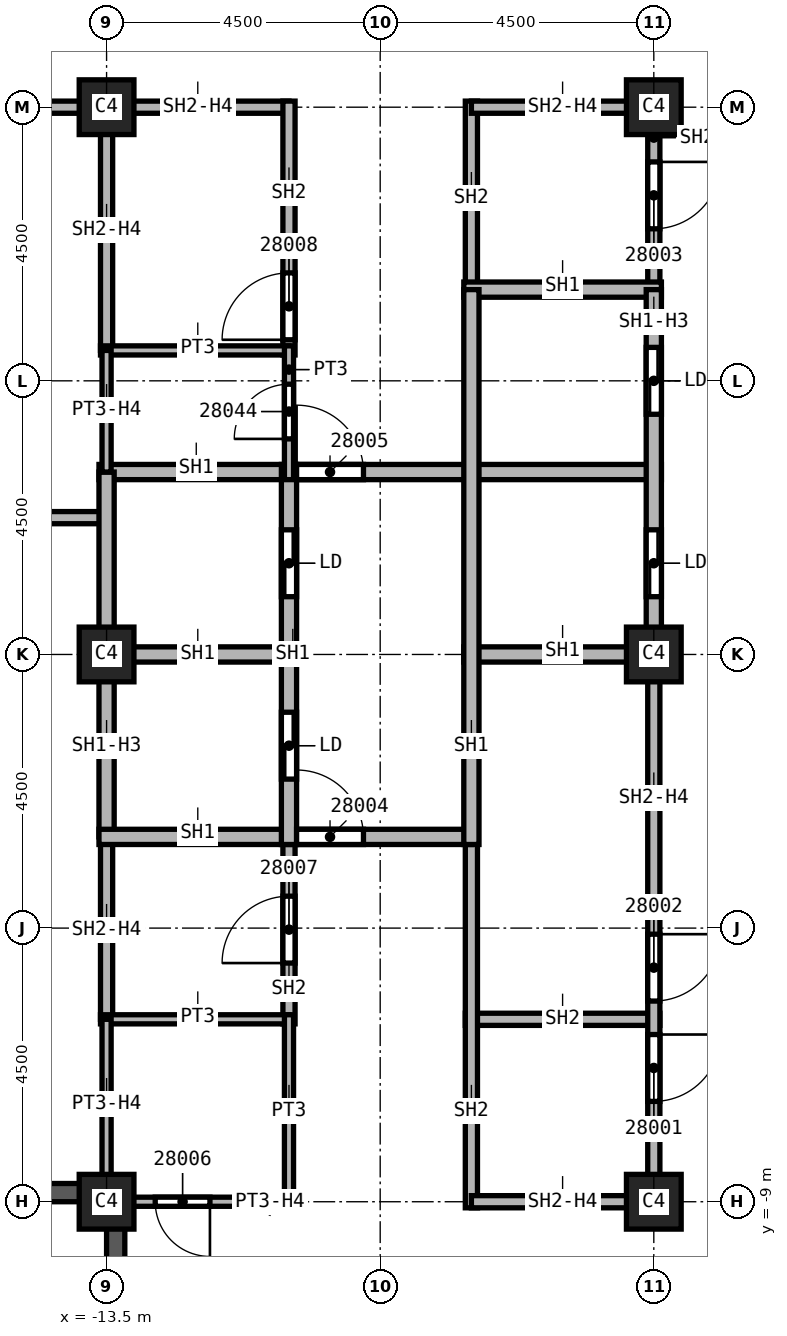
"""IFC4 building model, lengths in metres.
Left out: names, types, materials, properties, quantities, classifications, styles, units other than length and angle.
Written with IfcOpenShell. Run it as: python <this file> out.ifc"""

import sys

from ifc_helpers import new_model, si_unit, direction, frame, frame_2d, origin, origin_2d, place, context, subcontext, project, spatial, rectangle, extrude, element, fill, save


model = new_model("IFC4")
c1 = context("Model", 3, precision=1e-05, world=origin(), true_north=direction((0.0, 1.0)))
c2 = subcontext(c1, "Body", "Model", "MODEL_VIEW")
j1 = project(units=[si_unit("LENGTHUNIT", "METRE"), si_unit("PLANEANGLEUNIT", "RADIAN")], contexts=[c1])
p1 = place(None, origin())
s1 = spatial("IfcSite", under=j1, at=p1, CompositionType="ELEMENT")
p2 = place(p1, origin())
s2 = spatial("IfcBuilding", under=s1, at=p2, CompositionType="ELEMENT")
p3 = place(p2, frame((0.0, 0.0, 236.0)))
s3 = spatial("IfcBuildingStorey", under=s2, at=p3, CompositionType="ELEMENT", Elevation=236.0)
for number, where, z_axis, x_axis in (
    (1, (-4.5, 0.0, 0.0), (0.0, 0.0, 1.0), (1.0, 0.0, 0.0)),
    (2, (-4.5, 9.0, 0.0), (0.0, 0.0, 1.0), (1.0, 0.0, 0.0)),
    (3, (-4.5, -9.0, 0.0), (0.0, 0.0, 1.0), (1.0, 0.0, 0.0)),
    (4, (-13.5, 0.0, 0.0), (0.0, 0.0, 1.0), (1.0, 0.0, 0.0)),
    (5, (-13.5, 9.0, 0.0), (0.0, 0.0, 1.0), (1.0, 0.0, 0.0)),
    (6, (-13.5, -9.0, 0.0), (0.0, 0.0, 1.0), (1.0, 0.0, 0.0)),
):
    element("IfcColumn", number, at=place(p3, frame(where, z_axis=z_axis, x_axis=x_axis)), inside=s3, PredefinedType="COLUMN", context=c2, shape_type="SweptSolid", body=[
        extrude(rectangle(XDim=0.9, YDim=0.9, at=origin_2d()), origin(), (0.0, 0.0, 1.0), 5.72),
    ])
p4 = place(p3, frame((-13.35, -17.5, 0.0), z_axis=(0.0, 0.0, 1.0), x_axis=(0.0, 1.0, 0.0)))
e7 = element("IfcWall", 7, at=p4, inside=s3, PredefinedType="SOLIDWALL", context=c2, shape_type="SweptSolid", body=[
    extrude(rectangle(XDim=8.475, YDim=0.3, at=frame_2d((4.238, 0.0))), origin(), (0.0, 0.0, 1.0), 5.12),
])
p5 = place(p4, frame((3.425, 0.0, 0.0)))
e8 = element("IfcOpeningElement", 8, at=p5, cuts=e7, PredefinedType="OPENING", context=c2, shape_type="SweptSolid", body=[
    extrude(rectangle(XDim=1.2, YDim=2.4, at=frame_2d((0.6, 1.2))), frame((0.0, 0.15, 0.0), z_axis=(0.0, -1.0, 0.0), x_axis=(1.0, 0.0, 0.0)), (0.0, 0.0, 1.0), 0.3),
])
p6 = place(p3, frame((-22.0, -8.85, 0.0), z_axis=(0.0, 0.0, 1.0), x_axis=(1.0, 0.0, 0.0)))
e9 = element("IfcWall", 9, at=p6, inside=s3, PredefinedType="SOLIDWALL", context=c2, shape_type="SweptSolid", body=[
    extrude(rectangle(XDim=8.475, YDim=0.3, at=frame_2d((4.238, 0.0))), origin(), (0.0, 0.0, 1.0), 5.12),
])
for number, where, z_axis, x_axis in (
    (10, (-18.0, 2.25, 0.0), (0.0, 0.0, 1.0), (1.0, 0.0, 0.0)),
    (11, (-13.5, 9.0, 0.0), (0.0, 0.0, 1.0), (-1.0, 0.0, 0.0)),
):
    element("IfcWall", number, at=place(p3, frame(where, z_axis=z_axis, x_axis=x_axis)), inside=s3, PredefinedType="PARTITIONING", context=c2, shape_type="SweptSolid", body=[
        extrude(rectangle(XDim=4.5, YDim=0.2, at=frame_2d((2.25, 0.0))), origin(), (0.0, 0.0, 1.0), 5.72),
    ])
p7 = place(p3, frame((-13.6, 9.0, 0.0), z_axis=(0.0, 0.0, 1.0), x_axis=(1.0, 0.0, 0.0)))
e12 = element("IfcWall", 12, at=p7, inside=s3, PredefinedType="SOLIDWALL", context=c2, shape_type="SweptSolid", body=[
    extrude(rectangle(XDim=3.1, YDim=0.2, at=frame_2d((1.55, 0.0))), origin(), (0.0, 0.0, 1.0), 5.042),
])
p8 = place(p3, frame((-13.5, -6.0, 0.0), z_axis=(0.0, 0.0, 1.0), x_axis=(0.0, 1.0, 0.0)))
e13 = element("IfcWall", 13, at=p8, inside=s3, PredefinedType="SOLIDWALL", context=c2, shape_type="SweptSolid", body=[
    extrude(rectangle(XDim=3.0, YDim=0.2, at=frame_2d((1.5, 0.0))), origin(), (0.0, 0.0, 1.0), 5.042),
])
p9 = place(p3, frame((-13.5, 5.0, 0.0), z_axis=(0.0, 0.0, 1.0), x_axis=(0.0, 1.0, 0.0)))
e14 = element("IfcWall", 14, at=p9, inside=s3, PredefinedType="SOLIDWALL", context=c2, shape_type="SweptSolid", body=[
    extrude(rectangle(XDim=4.1, YDim=0.2, at=frame_2d((2.05, 0.0))), origin(), (0.0, 0.0, 1.0), 5.042),
])
p10 = place(p3, frame((-10.5, -6.075, 0.0), z_axis=(0.0, 0.0, 1.0), x_axis=(0.0, 1.0, 0.0)))
e15 = element("IfcWall", 15, at=p10, inside=s3, PredefinedType="SOLIDWALL", context=c2, shape_type="SweptSolid", body=[
    extrude(rectangle(XDim=3.2, YDim=0.2, at=frame_2d((1.6, 0.0))), origin(), (0.0, 0.0, 1.0), 5.72),
])
p11 = place(p10, frame((1.0, 0.0, 0.0)))
e16 = element("IfcOpeningElement", 16, at=p11, cuts=e15, PredefinedType="OPENING", context=c2, shape_type="SweptSolid", body=[
    extrude(rectangle(XDim=1.1, YDim=2.1, at=frame_2d((0.55, 1.05))), frame((0.0, 0.1, 0.0), z_axis=(0.0, -1.0, 0.0), x_axis=(1.0, 0.0, 0.0)), (0.0, 0.0, 1.0), 0.2),
])
p12 = place(p3, frame((-10.5, 4.925, 0.0), z_axis=(0.0, 0.0, 1.0), x_axis=(0.0, 1.0, 0.0)))
e17 = element("IfcWall", 17, at=p12, inside=s3, PredefinedType="SOLIDWALL", context=c2, shape_type="SweptSolid", body=[
    extrude(rectangle(XDim=4.175, YDim=0.2, at=frame_2d((2.087, 0.0))), origin(), (0.0, 0.0, 1.0), 5.72),
])
p13 = place(p12, frame((0.25, 0.0, 0.0)))
e18 = element("IfcOpeningElement", 18, at=p13, cuts=e17, PredefinedType="OPENING", context=c2, shape_type="SweptSolid", body=[
    extrude(rectangle(XDim=1.1, YDim=2.1, at=frame_2d((0.55, 1.05))), frame((0.0, 0.1, 0.0), z_axis=(0.0, -1.0, 0.0), x_axis=(1.0, 0.0, 0.0)), (0.0, 0.0, 1.0), 0.2),
])
p14 = place(p3, frame((-7.6, -6.0, 0.0), z_axis=(0.0, 0.0, 1.0), x_axis=(1.0, 0.0, 0.0)))
e19 = element("IfcWall", 19, at=p14, inside=s3, PredefinedType="SOLIDWALL", context=c2, shape_type="SweptSolid", body=[
    extrude(rectangle(XDim=3.2, YDim=0.2, at=frame_2d((1.6, 0.0))), origin(), (0.0, 0.0, 1.0), 5.72),
])
p15 = place(p3, frame((-7.5, -9.1, 0.0), z_axis=(0.0, 0.0, 1.0), x_axis=(0.0, 1.0, 0.0)))
e20 = element("IfcWall", 20, at=p15, inside=s3, PredefinedType="SOLIDWALL", context=c2, shape_type="SweptSolid", body=[
    extrude(rectangle(XDim=6.225, YDim=0.2, at=frame_2d((3.113, 0.0))), origin(), (0.0, 0.0, 1.0), 5.72),
])
p16 = place(p3, frame((-7.5, 6.0, 0.0), z_axis=(0.0, 0.0, 1.0), x_axis=(0.0, 1.0, 0.0)))
e21 = element("IfcWall", 21, at=p16, inside=s3, PredefinedType="SOLIDWALL", context=c2, shape_type="SweptSolid", body=[
    extrude(rectangle(XDim=3.1, YDim=0.2, at=frame_2d((1.55, 0.0))), origin(), (0.0, 0.0, 1.0), 5.72),
])
for number, where, z_axis, x_axis in (
    (22, (-7.5, 9.0, 0.0), (0.0, 0.0, 1.0), (1.0, 0.0, 0.0)),
    (23, (-4.5, -9.0, 0.0), (0.0, 0.0, 1.0), (-1.0, 0.0, 0.0)),
):
    element("IfcWall", number, at=place(p3, frame(where, z_axis=z_axis, x_axis=x_axis)), inside=s3, PredefinedType="SOLIDWALL", context=c2, shape_type="SweptSolid", body=[
        extrude(rectangle(XDim=3.0, YDim=0.2, at=frame_2d((1.5, 0.0))), origin(), (0.0, 0.0, 1.0), 5.042),
    ])
p17 = place(p3, frame((-4.5, 0.0, 0.0), z_axis=(0.0, 0.0, 1.0), x_axis=(0.0, -1.0, 0.0)))
e24 = element("IfcWall", 24, at=p17, inside=s3, PredefinedType="SOLIDWALL", context=c2, shape_type="SweptSolid", body=[
    extrude(rectangle(XDim=9.1, YDim=0.2, at=frame_2d((4.55, 0.0))), origin(), (0.0, 0.0, 1.0), 5.042),
])
p18 = place(p17, frame((6.25, 0.0, 0.0)))
e25 = element("IfcOpeningElement", 25, at=p18, cuts=e24, PredefinedType="OPENING", context=c2, shape_type="SweptSolid", body=[
    extrude(rectangle(XDim=1.1, YDim=2.1, at=frame_2d((0.55, 1.05))), frame((0.0, 0.1, 0.0), z_axis=(0.0, -1.0, 0.0), x_axis=(1.0, 0.0, 0.0)), (0.0, 0.0, 1.0), 0.2),
])
p19 = place(p17, frame((4.6, 0.0, 0.0)))
e26 = element("IfcOpeningElement", 26, at=p19, cuts=e24, PredefinedType="OPENING", context=c2, shape_type="SweptSolid", body=[
    extrude(rectangle(XDim=1.1, YDim=2.1, at=frame_2d((0.55, 1.05))), frame((0.0, 0.1, 0.0), z_axis=(0.0, -1.0, 0.0), x_axis=(1.0, 0.0, 0.0)), (0.0, 0.0, 1.0), 0.2),
])
p20 = place(p3, frame((-4.5, 9.1, 0.0), z_axis=(0.0, 0.0, 1.0), x_axis=(0.0, -1.0, 0.0)))
e27 = element("IfcWall", 27, at=p20, inside=s3, PredefinedType="SOLIDWALL", context=c2, shape_type="SweptSolid", body=[
    extrude(rectangle(XDim=3.1, YDim=0.2, at=frame_2d((1.55, 0.0))), origin(), (0.0, 0.0, 1.0), 5.042),
])
p21 = place(p20, frame((1.0, 0.0, 0.0)))
e28 = element("IfcOpeningElement", 28, at=p21, cuts=e27, PredefinedType="OPENING", context=c2, shape_type="SweptSolid", body=[
    extrude(rectangle(XDim=1.1, YDim=2.1, at=frame_2d((0.55, 1.05))), frame((0.0, 0.1, 0.0), z_axis=(0.0, -1.0, 0.0), x_axis=(1.0, 0.0, 0.0)), (0.0, 0.0, 1.0), 0.2),
])
p22 = place(p3, frame((-13.625, 0.0, 0.0), z_axis=(0.0, 0.0, 1.0), x_axis=(1.0, 0.0, 0.0)))
e29 = element("IfcWall", 29, at=p22, inside=s3, PredefinedType="SOLIDWALL", context=c2, shape_type="SweptSolid", body=[
    extrude(rectangle(XDim=3.125, YDim=0.25, at=frame_2d((1.562, 0.0))), origin(), (0.0, 0.0, 1.0), 5.72),
])
p23 = place(p3, frame((-13.625, 3.0, 0.0), z_axis=(0.0, 0.0, 1.0), x_axis=(1.0, 0.0, 0.0)))
e30 = element("IfcWall", 30, at=p23, inside=s3, PredefinedType="SOLIDWALL", context=c2, shape_type="SweptSolid", body=[
    extrude(rectangle(XDim=9.25, YDim=0.25, at=frame_2d((4.625, 0.0))), origin(), (0.0, 0.0, 1.0), 5.72),
])
p24 = place(p23, frame((3.25, 0.0, 0.0)))
e31 = element("IfcOpeningElement", 31, at=p24, cuts=e30, PredefinedType="OPENING", context=c2, shape_type="SweptSolid", body=[
    extrude(rectangle(XDim=1.1, YDim=2.1, at=frame_2d((0.55, 1.05))), frame((0.0, 0.125, 0.0), z_axis=(0.0, -1.0, 0.0), x_axis=(1.0, 0.0, 0.0)), (0.0, 0.0, 1.0), 0.25),
])
p25 = place(p3, frame((-13.5, -3.0, 0.0), z_axis=(0.0, 0.0, 1.0), x_axis=(0.0, 1.0, 0.0)))
e32 = element("IfcWall", 32, at=p25, inside=s3, PredefinedType="SOLIDWALL", context=c2, shape_type="SweptSolid", body=[
    extrude(rectangle(XDim=6.0, YDim=0.25, at=frame_2d((3.0, 0.0))), origin(), (0.0, 0.0, 1.0), 5.042),
])
p26 = place(p3, frame((-13.625, -3.0, 0.0), z_axis=(0.0, 0.0, 1.0), x_axis=(1.0, 0.0, 0.0)))
e33 = element("IfcWall", 33, at=p26, inside=s3, PredefinedType="SOLIDWALL", context=c2, shape_type="SweptSolid", body=[
    extrude(rectangle(XDim=6.125, YDim=0.25, at=frame_2d((3.062, 0.0))), origin(), (0.0, 0.0, 1.0), 5.72),
])
p27 = place(p26, frame((3.25, 0.0, 0.0)))
e34 = element("IfcOpeningElement", 34, at=p27, cuts=e33, PredefinedType="OPENING", context=c2, shape_type="SweptSolid", body=[
    extrude(rectangle(XDim=1.1, YDim=2.1, at=frame_2d((0.55, 1.05))), frame((0.0, 0.125, 0.0), z_axis=(0.0, -1.0, 0.0), x_axis=(1.0, 0.0, 0.0)), (0.0, 0.0, 1.0), 0.25),
])
p28 = place(p3, frame((-10.5, -3.125, 0.0), z_axis=(0.0, 0.0, 1.0), x_axis=(0.0, 1.0, 0.0)))
e35 = element("IfcWall", 35, at=p28, inside=s3, PredefinedType="SOLIDWALL", context=c2, shape_type="SweptSolid", body=[
    extrude(rectangle(XDim=6.25, YDim=0.25, at=frame_2d((3.125, 0.0))), origin(), (0.0, 0.0, 1.0), 5.72),
])
p29 = place(p28, frame((1.075, 0.0, 0.0)))
e36 = element("IfcOpeningElement", 36, at=p29, cuts=e35, PredefinedType="OPENING", context=c2, shape_type="SweptSolid", body=[
    extrude(rectangle(XDim=1.1, YDim=2.1, at=frame_2d((0.55, 1.05))), frame((0.0, 0.125, 0.0), z_axis=(0.0, -1.0, 0.0), x_axis=(1.0, 0.0, 0.0)), (0.0, 0.0, 1.0), 0.25),
])
p30 = place(p28, frame((4.075, 0.0, 0.0)))
e37 = element("IfcOpeningElement", 37, at=p30, cuts=e35, PredefinedType="OPENING", context=c2, shape_type="SweptSolid", body=[
    extrude(rectangle(XDim=1.1, YDim=2.1, at=frame_2d((0.55, 1.05))), frame((0.0, 0.125, 0.0), z_axis=(0.0, -1.0, 0.0), x_axis=(1.0, 0.0, 0.0)), (0.0, 0.0, 1.0), 0.25),
])
for number, where, z_axis, x_axis in (
    (38, (-7.625, 0.0, 0.0), (0.0, 0.0, 1.0), (1.0, 0.0, 0.0)),
    (39, (-7.625, 6.0, 0.0), (0.0, 0.0, 1.0), (1.0, 0.0, 0.0)),
):
    element("IfcWall", number, at=place(p3, frame(where, z_axis=z_axis, x_axis=x_axis)), inside=s3, PredefinedType="SOLIDWALL", context=c2, shape_type="SweptSolid", body=[
        extrude(rectangle(XDim=3.25, YDim=0.25, at=frame_2d((1.625, 0.0))), origin(), (0.0, 0.0, 1.0), 5.72),
    ])
p31 = place(p3, frame((-7.5, -3.125, 0.0), z_axis=(0.0, 0.0, 1.0), x_axis=(0.0, 1.0, 0.0)))
e40 = element("IfcWall", 40, at=p31, inside=s3, PredefinedType="SOLIDWALL", context=c2, shape_type="SweptSolid", body=[
    extrude(rectangle(XDim=9.125, YDim=0.25, at=frame_2d((4.562, 0.0))), origin(), (0.0, 0.0, 1.0), 5.72),
])
p32 = place(p3, frame((-4.5, 6.0, 0.0), z_axis=(0.0, 0.0, 1.0), x_axis=(0.0, -1.0, 0.0)))
e41 = element("IfcWall", 41, at=p32, inside=s3, PredefinedType="SOLIDWALL", context=c2, shape_type="SweptSolid", body=[
    extrude(rectangle(XDim=6.0, YDim=0.25, at=frame_2d((3.0, 0.0))), origin(), (0.0, 0.0, 1.0), 5.042),
])
p33 = place(p32, frame((3.95, 0.0, 0.0)))
e42 = element("IfcOpeningElement", 42, at=p33, cuts=e41, PredefinedType="OPENING", context=c2, shape_type="SweptSolid", body=[
    extrude(rectangle(XDim=1.1, YDim=2.1, at=frame_2d((0.55, 1.05))), frame((0.0, 0.125, 0.0), z_axis=(0.0, -1.0, 0.0), x_axis=(1.0, 0.0, 0.0)), (0.0, 0.0, 1.0), 0.25),
])
p34 = place(p32, frame((0.95, 0.0, 0.0)))
e43 = element("IfcOpeningElement", 43, at=p34, cuts=e41, PredefinedType="OPENING", context=c2, shape_type="SweptSolid", body=[
    extrude(rectangle(XDim=1.1, YDim=2.1, at=frame_2d((0.55, 1.05))), frame((0.0, 0.125, 0.0), z_axis=(0.0, -1.0, 0.0), x_axis=(1.0, 0.0, 0.0)), (0.0, 0.0, 1.0), 0.25),
])
for number, where, z_axis, x_axis in (
    (44, (-13.6, -6.0, 0.0), (0.0, 0.0, 1.0), (1.0, 0.0, 0.0)),
    (45, (-13.6, 5.0, 0.0), (0.0, 0.0, 1.0), (1.0, 0.0, 0.0)),
):
    element("IfcWall", number, at=place(p3, frame(where, z_axis=z_axis, x_axis=x_axis)), inside=s3, PredefinedType="PARTITIONING", context=c2, shape_type="SweptSolid", body=[
        extrude(rectangle(XDim=3.1, YDim=0.15, at=frame_2d((1.55, 0.0))), origin(), (0.0, 0.0, 1.0), 5.72),
    ])
p35 = place(p3, frame((-13.5, -9.0, 0.0), z_axis=(0.0, 0.0, 1.0), x_axis=(0.0, 1.0, 0.0)))
e46 = element("IfcWall", 46, at=p35, inside=s3, PredefinedType="PARTITIONING", context=c2, shape_type="SweptSolid", body=[
    extrude(rectangle(XDim=3.0, YDim=0.15, at=frame_2d((1.5, 0.0))), origin(), (0.0, 0.0, 1.0), 5.042),
])
p36 = place(p3, frame((-13.5, 3.0, 0.0), z_axis=(0.0, 0.0, 1.0), x_axis=(0.0, 1.0, 0.0)))
e47 = element("IfcWall", 47, at=p36, inside=s3, PredefinedType="PARTITIONING", context=c2, shape_type="SweptSolid", body=[
    extrude(rectangle(XDim=2.0, YDim=0.15, at=frame_2d((1.0, 0.0))), origin(), (0.0, 0.0, 1.0), 5.042),
])
p37 = place(p3, frame((-10.5, -9.075, 0.0), z_axis=(0.0, 0.0, 1.0), x_axis=(0.0, 1.0, 0.0)))
e48 = element("IfcWall", 48, at=p37, inside=s3, PredefinedType="PARTITIONING", context=c2, shape_type="SweptSolid", body=[
    extrude(rectangle(XDim=3.15, YDim=0.15, at=frame_2d((1.575, 0.0))), origin(), (0.0, 0.0, 1.0), 5.72),
])
p38 = place(p3, frame((-10.5, -9.0, 0.0), z_axis=(0.0, 0.0, 1.0), x_axis=(-1.0, 0.0, 0.0)))
e49 = element("IfcWall", 49, at=p38, inside=s3, PredefinedType="PARTITIONING", context=c2, shape_type="SweptSolid", body=[
    extrude(rectangle(XDim=3.025, YDim=0.15, at=frame_2d((1.512, 0.0))), origin(), (0.0, 0.0, 1.0), 5.042),
])
p39 = place(p38, frame((1.3, 0.0, 0.0)))
e50 = element("IfcOpeningElement", 50, at=p39, cuts=e49, PredefinedType="OPENING", context=c2, shape_type="SweptSolid", body=[
    extrude(rectangle(XDim=0.9, YDim=2.1, at=frame_2d((0.45, 1.05))), frame((0.0, 0.075, 0.0), z_axis=(0.0, -1.0, 0.0), x_axis=(1.0, 0.0, 0.0)), (0.0, 0.0, 1.0), 0.15),
])
p40 = place(p3, frame((-10.5, 2.875, 0.0), z_axis=(0.0, 0.0, 1.0), x_axis=(0.0, 1.0, 0.0)))
e51 = element("IfcWall", 51, at=p40, inside=s3, PredefinedType="PARTITIONING", context=c2, shape_type="SweptSolid", body=[
    extrude(rectangle(XDim=2.2, YDim=0.15, at=frame_2d((1.1, 0.0))), origin(), (0.0, 0.0, 1.0), 5.72),
])
p41 = place(p40, frame((0.67, 0.0, 0.0)))
e52 = element("IfcOpeningElement", 52, at=p41, cuts=e51, PredefinedType="OPENING", context=c2, shape_type="SweptSolid", body=[
    extrude(rectangle(XDim=0.9, YDim=2.1, at=frame_2d((0.45, 1.05))), frame((0.0, 0.075, 0.0), z_axis=(0.0, -1.0, 0.0), x_axis=(1.0, 0.0, 0.0)), (0.0, 0.0, 1.0), 0.15),
])
p42 = place(p18, origin())
e53 = element("IfcDoor", 53, at=p42, inside=s3, OperationType="SINGLE_SWING_RIGHT", PredefinedType="DOOR", context=c2, shape_type="SweptSolid", body=[
    extrude(rectangle(XDim=1.1, YDim=2.1, at=frame_2d((0.55, 1.05))), frame((0.0, 0.025, 0.0), z_axis=(0.0, -1.0, 0.0), x_axis=(1.0, 0.0, 0.0)), (0.0, 0.0, 1.0), 0.05),
])
fill(e25, e53)
p43 = place(p19, origin())
e54 = element("IfcDoor", 54, at=p43, inside=s3, OperationType="SINGLE_SWING_LEFT", PredefinedType="DOOR", context=c2, shape_type="SweptSolid", body=[
    extrude(rectangle(XDim=1.1, YDim=2.1, at=frame_2d((0.55, 1.05))), frame((0.0, 0.025, 0.0), z_axis=(0.0, -1.0, 0.0), x_axis=(1.0, 0.0, 0.0)), (0.0, 0.0, 1.0), 0.05),
])
fill(e26, e54)
p44 = place(p21, origin())
e55 = element("IfcDoor", 55, at=p44, inside=s3, OperationType="SINGLE_SWING_RIGHT", PredefinedType="DOOR", context=c2, shape_type="SweptSolid", body=[
    extrude(rectangle(XDim=1.1, YDim=2.1, at=frame_2d((0.55, 1.05))), frame((0.0, 0.025, 0.0), z_axis=(0.0, -1.0, 0.0), x_axis=(1.0, 0.0, 0.0)), (0.0, 0.0, 1.0), 0.05),
])
fill(e28, e55)
p45 = place(p27, origin())
e56 = element("IfcDoor", 56, at=p45, inside=s3, OperationType="SINGLE_SWING_LEFT", PredefinedType="DOOR", context=c2, shape_type="SweptSolid", body=[
    extrude(rectangle(XDim=1.1, YDim=2.1, at=frame_2d((0.55, 1.05))), frame((0.0, 0.025, 0.0), z_axis=(0.0, -1.0, 0.0), x_axis=(1.0, 0.0, 0.0)), (0.0, 0.0, 1.0), 0.05),
])
fill(e34, e56)
p46 = place(p24, origin())
e57 = element("IfcDoor", 57, at=p46, inside=s3, OperationType="SINGLE_SWING_RIGHT", PredefinedType="DOOR", context=c2, shape_type="SweptSolid", body=[
    extrude(rectangle(XDim=1.1, YDim=2.1, at=frame_2d((0.55, 1.05))), frame((0.0, 0.025, 0.0), z_axis=(0.0, -1.0, 0.0), x_axis=(1.0, 0.0, 0.0)), (0.0, 0.0, 1.0), 0.05),
])
fill(e31, e57)
p47 = place(p39, origin())
e58 = element("IfcDoor", 58, at=p47, inside=s3, OperationType="SINGLE_SWING_LEFT", PredefinedType="DOOR", context=c2, shape_type="SweptSolid", body=[
    extrude(rectangle(XDim=0.9, YDim=2.1, at=frame_2d((0.45, 1.05))), frame((0.0, 0.025, 0.0), z_axis=(0.0, -1.0, 0.0), x_axis=(1.0, 0.0, 0.0)), (0.0, 0.0, 1.0), 0.05),
])
fill(e50, e58)
p48 = place(p11, origin())
e59 = element("IfcDoor", 59, at=p48, inside=s3, OperationType="SINGLE_SWING_RIGHT", PredefinedType="DOOR", context=c2, shape_type="SweptSolid", body=[
    extrude(rectangle(XDim=1.1, YDim=2.1, at=frame_2d((0.55, 1.05))), frame((0.0, 0.025, 0.0), z_axis=(0.0, -1.0, 0.0), x_axis=(1.0, 0.0, 0.0)), (0.0, 0.0, 1.0), 0.05),
])
fill(e16, e59)
p49 = place(p13, origin())
e60 = element("IfcDoor", 60, at=p49, inside=s3, OperationType="SINGLE_SWING_LEFT", PredefinedType="DOOR", context=c2, shape_type="SweptSolid", body=[
    extrude(rectangle(XDim=1.1, YDim=2.1, at=frame_2d((0.55, 1.05))), frame((0.0, 0.025, 0.0), z_axis=(0.0, -1.0, 0.0), x_axis=(1.0, 0.0, 0.0)), (0.0, 0.0, 1.0), 0.05),
])
fill(e18, e60)
p50 = place(p41, origin())
e61 = element("IfcDoor", 61, at=p50, inside=s3, OperationType="SINGLE_SWING_LEFT", PredefinedType="DOOR", context=c2, shape_type="SweptSolid", body=[
    extrude(rectangle(XDim=0.9, YDim=2.1, at=frame_2d((0.45, 1.05))), frame((0.0, 0.025, 0.0), z_axis=(0.0, -1.0, 0.0), x_axis=(1.0, 0.0, 0.0)), (0.0, 0.0, 1.0), 0.05),
])
fill(e52, e61)
p51 = place(p33, origin())
e62 = element("IfcDoor", 62, at=p51, inside=s3, OperationType="SLIDING_TO_LEFT", PredefinedType="DOOR", context=c2, shape_type="SweptSolid", body=[
    extrude(rectangle(XDim=1.1, YDim=2.1, at=frame_2d((0.55, 1.05))), frame((0.0, 0.025, 0.0), z_axis=(0.0, -1.0, 0.0), x_axis=(1.0, 0.0, 0.0)), (0.0, 0.0, 1.0), 0.05),
])
fill(e42, e62)
p52 = place(p34, origin())
e63 = element("IfcDoor", 63, at=p52, inside=s3, OperationType="SLIDING_TO_LEFT", PredefinedType="DOOR", context=c2, shape_type="SweptSolid", body=[
    extrude(rectangle(XDim=1.1, YDim=2.1, at=frame_2d((0.55, 1.05))), frame((0.0, 0.025, 0.0), z_axis=(0.0, -1.0, 0.0), x_axis=(1.0, 0.0, 0.0)), (0.0, 0.0, 1.0), 0.05),
])
fill(e43, e63)
p53 = place(p29, origin())
e64 = element("IfcDoor", 64, at=p53, inside=s3, OperationType="SLIDING_TO_LEFT", PredefinedType="DOOR", context=c2, shape_type="SweptSolid", body=[
    extrude(rectangle(XDim=1.1, YDim=2.1, at=frame_2d((0.55, 1.05))), frame((0.0, 0.025, 0.0), z_axis=(0.0, -1.0, 0.0), x_axis=(1.0, 0.0, 0.0)), (0.0, 0.0, 1.0), 0.05),
])
fill(e36, e64)
p54 = place(p30, origin())
e65 = element("IfcDoor", 65, at=p54, inside=s3, OperationType="SLIDING_TO_LEFT", PredefinedType="DOOR", context=c2, shape_type="SweptSolid", body=[
    extrude(rectangle(XDim=1.1, YDim=2.1, at=frame_2d((0.55, 1.05))), frame((0.0, 0.025, 0.0), z_axis=(0.0, -1.0, 0.0), x_axis=(1.0, 0.0, 0.0)), (0.0, 0.0, 1.0), 0.05),
])
fill(e37, e65)
save(model, sys.argv[1])
